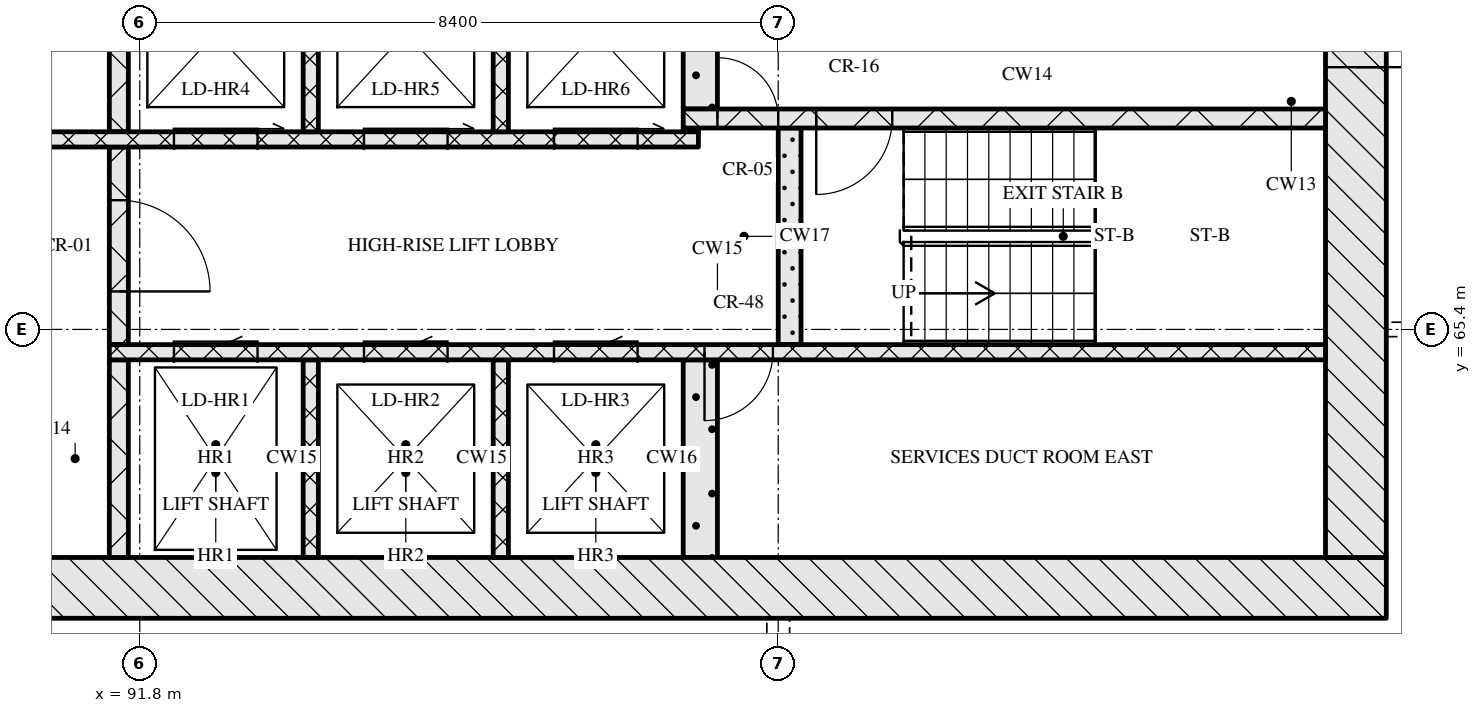
"""IFC4 building model, lengths in metres.
Left out: names, types, materials, properties, quantities, classifications, styles, units other than length and angle.
Written with IfcOpenShell. Run it as: python <this file> out.ifc"""

import sys

from ifc_helpers import new_model, si_unit, direction, frame, frame_2d, origin, place, context, subcontext, project, spatial, rectangle, extrude, element, fill, save


model = new_model("IFC4")
c1 = context("Model", 3, precision=1e-05, world=origin(), true_north=direction((0.0, 1.0)))
c2 = subcontext(c1, "Body", "Model", "MODEL_VIEW")
j1 = project(units=[si_unit("LENGTHUNIT", "METRE"), si_unit("PLANEANGLEUNIT", "RADIAN")], contexts=[c1])
p1 = place(None, origin())
s1 = spatial("IfcSite", under=j1, at=p1, CompositionType="ELEMENT")
p2 = place(p1, origin())
s2 = spatial("IfcBuilding", under=s1, at=p2, CompositionType="ELEMENT")
p3 = place(p2, frame((0.0, 0.0, 187.05)))
s3 = spatial("IfcBuildingStorey", under=s2, at=p3, CompositionType="ELEMENT", Elevation=187.05)
p4 = place(p3, frame((67.0, 62.0, 0.0), z_axis=(0.0, 0.0, 1.0), x_axis=(1.0, 0.0, 0.0)))
e1 = element("IfcWall", 1, at=p4, inside=s3, PredefinedType="SOLIDWALL", context=c2, shape_type="SweptSolid", body=[
    extrude(rectangle(XDim=41.2, YDim=0.8, at=frame_2d((20.6, 0.0))), origin(), (0.0, 0.0, 1.0), 3.32),
])
p5 = place(p4, frame((20.95, 0.0, 0.0)))
e2 = element("IfcOpeningElement", 2, at=p5, cuts=e1, PredefinedType="OPENING", context=c2, shape_type="SweptSolid", body=[
    extrude(rectangle(XDim=1.8, YDim=2.1, at=frame_2d((0.9, 1.05))), frame((0.0, 0.41, 0.0), z_axis=(0.0, -1.0, 0.0), x_axis=(1.0, 0.0, 0.0)), (0.0, 0.0, 1.0), 0.82),
])
p6 = place(p3, frame((107.8, 62.4, 0.0), z_axis=(0.0, 0.0, 1.0), x_axis=(0.0, 1.0, 0.0)))
e3 = element("IfcWall", 3, at=p6, inside=s3, PredefinedType="SOLIDWALL", context=c2, shape_type="SweptSolid", body=[
    extrude(rectangle(XDim=12.0, YDim=0.8, at=frame_2d((6.0, 0.0))), origin(), (0.0, 0.0, 1.0), 3.32),
])
p7 = place(p6, frame((6.45, 0.0, 0.0)))
e4 = element("IfcOpeningElement", 4, at=p7, cuts=e3, PredefinedType="OPENING", context=c2, shape_type="SweptSolid", body=[
    extrude(rectangle(XDim=1.2, YDim=2.1, at=frame_2d((0.6, 1.05))), frame((0.0, 0.41, 0.0), z_axis=(0.0, -1.0, 0.0), x_axis=(1.0, 0.0, 0.0)), (0.0, 0.0, 1.0), 0.82),
])
p8 = place(p3, frame((91.525, 62.4, 0.0), z_axis=(0.0, 0.0, 1.0), x_axis=(0.0, 1.0, 0.0)))
e5 = element("IfcWall", 5, at=p8, inside=s3, PredefinedType="SOLIDWALL", context=c2, shape_type="SweptSolid", body=[
    extrude(rectangle(XDim=2.6, YDim=0.25, at=frame_2d((1.3, 0.0))), origin(), (0.0, 0.0, 1.0), 3.32),
])
for number, where, z_axis, x_axis in (
    (6, (94.05, 62.4, 0.0), (0.0, 0.0, 1.0), (0.0, 1.0, 0.0)),
    (7, (96.55, 62.4, 0.0), (0.0, 0.0, 1.0), (0.0, 1.0, 0.0)),
):
    element("IfcWall", number, at=place(p3, frame(where, z_axis=z_axis, x_axis=x_axis)), inside=s3, PredefinedType="SOLIDWALL", context=c2, shape_type="SweptSolid", body=[
        extrude(rectangle(XDim=2.6, YDim=0.2, at=frame_2d((1.3, 0.0))), origin(), (0.0, 0.0, 1.0), 3.32),
    ])
p9 = place(p3, frame((99.175, 62.4, 0.0), z_axis=(0.0, 0.0, 1.0), x_axis=(0.0, 1.0, 0.0)))
e8 = element("IfcWall", 8, at=p9, inside=s3, PredefinedType="SOLIDWALL", context=c2, shape_type="SweptSolid", body=[
    extrude(rectangle(XDim=2.6, YDim=0.45, at=frame_2d((1.3, 0.0))), origin(), (0.0, 0.0, 1.0), 3.32),
])
p10 = place(p3, frame((91.4, 65.1, 0.0), z_axis=(0.0, 0.0, 1.0), x_axis=(1.0, 0.0, 0.0)))
e9 = element("IfcWall", 9, at=p10, inside=s3, PredefinedType="SOLIDWALL", context=c2, shape_type="SweptSolid", body=[
    extrude(rectangle(XDim=16.0, YDim=0.2, at=frame_2d((8.0, 0.0))), origin(), (0.0, 0.0, 1.0), 3.32),
])
p11 = place(p10, frame((0.85, 0.0, 0.0)))
e10 = element("IfcOpeningElement", 10, at=p11, cuts=e9, PredefinedType="OPENING", context=c2, shape_type="SweptSolid", body=[
    extrude(rectangle(XDim=1.1, YDim=2.1, at=frame_2d((0.55, 1.05))), frame((0.0, 0.11, 0.0), z_axis=(0.0, -1.0, 0.0), x_axis=(1.0, 0.0, 0.0)), (0.0, 0.0, 1.0), 0.22),
])
p12 = place(p10, frame((3.35, 0.0, 0.0)))
e11 = element("IfcOpeningElement", 11, at=p12, cuts=e9, PredefinedType="OPENING", context=c2, shape_type="SweptSolid", body=[
    extrude(rectangle(XDim=1.1, YDim=2.1, at=frame_2d((0.55, 1.05))), frame((0.0, 0.11, 0.0), z_axis=(0.0, -1.0, 0.0), x_axis=(1.0, 0.0, 0.0)), (0.0, 0.0, 1.0), 0.22),
])
p13 = place(p10, frame((5.85, 0.0, 0.0)))
e12 = element("IfcOpeningElement", 12, at=p13, cuts=e9, PredefinedType="OPENING", context=c2, shape_type="SweptSolid", body=[
    extrude(rectangle(XDim=1.1, YDim=2.1, at=frame_2d((0.55, 1.05))), frame((0.0, 0.11, 0.0), z_axis=(0.0, -1.0, 0.0), x_axis=(1.0, 0.0, 0.0)), (0.0, 0.0, 1.0), 0.22),
])
p14 = place(p10, frame((7.83, 0.0, 0.0)))
e13 = element("IfcOpeningElement", 13, at=p14, cuts=e9, PredefinedType="OPENING", context=c2, shape_type="SweptSolid", body=[
    extrude(rectangle(XDim=0.9, YDim=2.1, at=frame_2d((0.45, 1.05))), frame((0.0, 0.11, 0.0), z_axis=(0.0, -1.0, 0.0), x_axis=(1.0, 0.0, 0.0)), (0.0, 0.0, 1.0), 0.22),
])
p15 = place(p3, frame((91.525, 65.2, 0.0), z_axis=(0.0, 0.0, 1.0), x_axis=(0.0, 1.0, 0.0)))
e14 = element("IfcWall", 14, at=p15, inside=s3, PredefinedType="SOLIDWALL", context=c2, shape_type="SweptSolid", body=[
    extrude(rectangle(XDim=2.6, YDim=0.25, at=frame_2d((1.3, 0.0))), origin(), (0.0, 0.0, 1.0), 3.32),
])
p16 = place(p15, frame((0.7, 0.0, 0.0)))
e15 = element("IfcOpeningElement", 15, at=p16, cuts=e14, PredefinedType="OPENING", context=c2, shape_type="SweptSolid", body=[
    extrude(rectangle(XDim=1.2, YDim=2.1, at=frame_2d((0.6, 1.05))), frame((0.0, 0.135, 0.0), z_axis=(0.0, -1.0, 0.0), x_axis=(1.0, 0.0, 0.0)), (0.0, 0.0, 1.0), 0.27),
])
p17 = place(p3, frame((100.35, 65.2, 0.0), z_axis=(0.0, 0.0, 1.0), x_axis=(0.0, 1.0, 0.0)))
e16 = element("IfcWall", 16, at=p17, inside=s3, PredefinedType="SOLIDWALL", context=c2, shape_type="SweptSolid", body=[
    extrude(rectangle(XDim=2.85, YDim=0.3, at=frame_2d((1.425, 0.0))), origin(), (0.0, 0.0, 1.0), 3.32),
])
p18 = place(p3, frame((76.05, 67.9, 0.0), z_axis=(0.0, 0.0, 1.0), x_axis=(1.0, 0.0, 0.0)))
e17 = element("IfcWall", 17, at=p18, inside=s3, PredefinedType="SOLIDWALL", context=c2, shape_type="SweptSolid", body=[
    extrude(rectangle(XDim=23.1, YDim=0.2, at=frame_2d((11.55, 0.0))), origin(), (0.0, 0.0, 1.0), 3.32),
])
p19 = place(p18, frame((0.75, 0.0, 0.0)))
e18 = element("IfcOpeningElement", 18, at=p19, cuts=e17, PredefinedType="OPENING", context=c2, shape_type="SweptSolid", body=[
    extrude(rectangle(XDim=0.9, YDim=2.1, at=frame_2d((0.45, 1.05))), frame((0.0, 0.11, 0.0), z_axis=(0.0, -1.0, 0.0), x_axis=(1.0, 0.0, 0.0)), (0.0, 0.0, 1.0), 0.22),
])
p20 = place(p18, frame((3.32, 0.0, 0.0)))
e19 = element("IfcOpeningElement", 19, at=p20, cuts=e17, PredefinedType="OPENING", context=c2, shape_type="SweptSolid", body=[
    extrude(rectangle(XDim=0.9, YDim=2.1, at=frame_2d((0.45, 1.05))), frame((0.0, 0.11, 0.0), z_axis=(0.0, -1.0, 0.0), x_axis=(1.0, 0.0, 0.0)), (0.0, 0.0, 1.0), 0.22),
])
p21 = place(p18, frame((5.77, 0.0, 0.0)))
e20 = element("IfcOpeningElement", 20, at=p21, cuts=e17, PredefinedType="OPENING", context=c2, shape_type="SweptSolid", body=[
    extrude(rectangle(XDim=0.9, YDim=2.1, at=frame_2d((0.45, 1.05))), frame((0.0, 0.11, 0.0), z_axis=(0.0, -1.0, 0.0), x_axis=(1.0, 0.0, 0.0)), (0.0, 0.0, 1.0), 0.22),
])
p22 = place(p18, frame((8.45, 0.0, 0.0)))
e21 = element("IfcOpeningElement", 21, at=p22, cuts=e17, PredefinedType="OPENING", context=c2, shape_type="SweptSolid", body=[
    extrude(rectangle(XDim=0.9, YDim=2.1, at=frame_2d((0.45, 1.05))), frame((0.0, 0.11, 0.0), z_axis=(0.0, -1.0, 0.0), x_axis=(1.0, 0.0, 0.0)), (0.0, 0.0, 1.0), 0.22),
])
p23 = place(p18, frame((10.91, 0.0, 0.0)))
e22 = element("IfcOpeningElement", 22, at=p23, cuts=e17, PredefinedType="OPENING", context=c2, shape_type="SweptSolid", body=[
    extrude(rectangle(XDim=0.9, YDim=2.1, at=frame_2d((0.45, 1.05))), frame((0.0, 0.11, 0.0), z_axis=(0.0, -1.0, 0.0), x_axis=(1.0, 0.0, 0.0)), (0.0, 0.0, 1.0), 0.22),
])
p24 = place(p18, frame((13.55, 0.0, 0.0)))
e23 = element("IfcOpeningElement", 23, at=p24, cuts=e17, PredefinedType="OPENING", context=c2, shape_type="SweptSolid", body=[
    extrude(rectangle(XDim=1.0, YDim=2.1, at=frame_2d((0.5, 1.05))), frame((0.0, 0.11, 0.0), z_axis=(0.0, -1.0, 0.0), x_axis=(1.0, 0.0, 0.0)), (0.0, 0.0, 1.0), 0.22),
])
p25 = place(p18, frame((16.2, 0.0, 0.0)))
e24 = element("IfcOpeningElement", 24, at=p25, cuts=e17, PredefinedType="OPENING", context=c2, shape_type="SweptSolid", body=[
    extrude(rectangle(XDim=1.1, YDim=2.1, at=frame_2d((0.55, 1.05))), frame((0.0, 0.11, 0.0), z_axis=(0.0, -1.0, 0.0), x_axis=(1.0, 0.0, 0.0)), (0.0, 0.0, 1.0), 0.22),
])
p26 = place(p18, frame((18.7, 0.0, 0.0)))
e25 = element("IfcOpeningElement", 25, at=p26, cuts=e17, PredefinedType="OPENING", context=c2, shape_type="SweptSolid", body=[
    extrude(rectangle(XDim=1.1, YDim=2.1, at=frame_2d((0.55, 1.05))), frame((0.0, 0.11, 0.0), z_axis=(0.0, -1.0, 0.0), x_axis=(1.0, 0.0, 0.0)), (0.0, 0.0, 1.0), 0.22),
])
p27 = place(p18, frame((21.2, 0.0, 0.0)))
e26 = element("IfcOpeningElement", 26, at=p27, cuts=e17, PredefinedType="OPENING", context=c2, shape_type="SweptSolid", body=[
    extrude(rectangle(XDim=1.1, YDim=2.1, at=frame_2d((0.55, 1.05))), frame((0.0, 0.11, 0.0), z_axis=(0.0, -1.0, 0.0), x_axis=(1.0, 0.0, 0.0)), (0.0, 0.0, 1.0), 0.22),
])
p28 = place(p3, frame((91.525, 68.0, 0.0), z_axis=(0.0, 0.0, 1.0), x_axis=(0.0, 1.0, 0.0)))
e27 = element("IfcWall", 27, at=p28, inside=s3, PredefinedType="SOLIDWALL", context=c2, shape_type="SweptSolid", body=[
    extrude(rectangle(XDim=2.6, YDim=0.25, at=frame_2d((1.3, 0.0))), origin(), (0.0, 0.0, 1.0), 3.32),
])
for number, where, z_axis, x_axis in (
    (28, (94.05, 68.0, 0.0), (0.0, 0.0, 1.0), (0.0, 1.0, 0.0)),
    (29, (96.55, 68.0, 0.0), (0.0, 0.0, 1.0), (0.0, 1.0, 0.0)),
):
    element("IfcWall", number, at=place(p3, frame(where, z_axis=z_axis, x_axis=x_axis)), inside=s3, PredefinedType="SOLIDWALL", context=c2, shape_type="SweptSolid", body=[
        extrude(rectangle(XDim=2.6, YDim=0.2, at=frame_2d((1.3, 0.0))), origin(), (0.0, 0.0, 1.0), 3.32),
    ])
p29 = place(p3, frame((98.95, 68.025, 0.0), z_axis=(0.0, 0.0, 1.0), x_axis=(1.0, 0.0, 0.0)))
e30 = element("IfcWall", 30, at=p29, inside=s3, PredefinedType="SOLIDWALL", context=c2, shape_type="SweptSolid", body=[
    extrude(rectangle(XDim=0.2, YDim=0.05, at=frame_2d((0.1, 0.0))), origin(), (0.0, 0.0, 1.0), 3.32),
])
p30 = place(p3, frame((98.95, 68.175, 0.0), z_axis=(0.0, 0.0, 1.0), x_axis=(1.0, 0.0, 0.0)))
e31 = element("IfcWall", 31, at=p30, inside=s3, PredefinedType="SOLIDWALL", context=c2, shape_type="SweptSolid", body=[
    extrude(rectangle(XDim=8.45, YDim=0.25, at=frame_2d((4.225, 0.0))), origin(), (0.0, 0.0, 1.0), 3.32),
])
p31 = place(p30, frame((0.45, 0.0, 0.0)))
e32 = element("IfcOpeningElement", 32, at=p31, cuts=e31, PredefinedType="OPENING", context=c2, shape_type="SweptSolid", body=[
    extrude(rectangle(XDim=0.8, YDim=2.1, at=frame_2d((0.4, 1.05))), frame((0.0, 0.135, 0.0), z_axis=(0.0, -1.0, 0.0), x_axis=(1.0, 0.0, 0.0)), (0.0, 0.0, 1.0), 0.27),
])
p32 = place(p30, frame((1.75, 0.0, 0.0)))
e33 = element("IfcOpeningElement", 33, at=p32, cuts=e31, PredefinedType="OPENING", context=c2, shape_type="SweptSolid", body=[
    extrude(rectangle(XDim=1.0, YDim=2.1, at=frame_2d((0.5, 1.05))), frame((0.0, 0.135, 0.0), z_axis=(0.0, -1.0, 0.0), x_axis=(1.0, 0.0, 0.0)), (0.0, 0.0, 1.0), 0.27),
])
p33 = place(p3, frame((99.175, 68.3, 0.0), z_axis=(0.0, 0.0, 1.0), x_axis=(0.0, 1.0, 0.0)))
e34 = element("IfcWall", 34, at=p33, inside=s3, PredefinedType="SOLIDWALL", context=c2, shape_type="SweptSolid", body=[
    extrude(rectangle(XDim=2.3, YDim=0.45, at=frame_2d((1.15, 0.0))), origin(), (0.0, 0.0, 1.0), 3.32),
])
p34 = place(p11, origin())
e35 = element("IfcDoor", 35, at=p34, inside=s3, OperationType="SLIDING_TO_LEFT", PredefinedType="DOOR", context=c2, shape_type="SweptSolid", body=[
    extrude(rectangle(XDim=1.1, YDim=2.1, at=frame_2d((0.55, 1.05))), frame((0.0, 0.025, 0.0), z_axis=(0.0, -1.0, 0.0), x_axis=(1.0, 0.0, 0.0)), (0.0, 0.0, 1.0), 0.05),
])
fill(e10, e35)
p35 = place(p12, origin())
e36 = element("IfcDoor", 36, at=p35, inside=s3, OperationType="SLIDING_TO_LEFT", PredefinedType="DOOR", context=c2, shape_type="SweptSolid", body=[
    extrude(rectangle(XDim=1.1, YDim=2.1, at=frame_2d((0.55, 1.05))), frame((0.0, 0.025, 0.0), z_axis=(0.0, -1.0, 0.0), x_axis=(1.0, 0.0, 0.0)), (0.0, 0.0, 1.0), 0.05),
])
fill(e11, e36)
p36 = place(p13, origin())
e37 = element("IfcDoor", 37, at=p36, inside=s3, OperationType="SLIDING_TO_LEFT", PredefinedType="DOOR", context=c2, shape_type="SweptSolid", body=[
    extrude(rectangle(XDim=1.1, YDim=2.1, at=frame_2d((0.55, 1.05))), frame((0.0, 0.025, 0.0), z_axis=(0.0, -1.0, 0.0), x_axis=(1.0, 0.0, 0.0)), (0.0, 0.0, 1.0), 0.05),
])
fill(e12, e37)
p37 = place(p14, origin())
e38 = element("IfcDoor", 38, at=p37, inside=s3, OperationType="SINGLE_SWING_RIGHT", PredefinedType="DOOR", context=c2, shape_type="SweptSolid", body=[
    extrude(rectangle(XDim=0.9, YDim=2.1, at=frame_2d((0.45, 1.05))), frame((0.0, 0.025, 0.0), z_axis=(0.0, -1.0, 0.0), x_axis=(1.0, 0.0, 0.0)), (0.0, 0.0, 1.0), 0.05),
])
fill(e13, e38)
p38 = place(p16, origin())
e39 = element("IfcDoor", 39, at=p38, inside=s3, OperationType="SINGLE_SWING_RIGHT", PredefinedType="DOOR", context=c2, shape_type="SweptSolid", body=[
    extrude(rectangle(XDim=1.2, YDim=2.1, at=frame_2d((0.6, 1.05))), frame((0.0, 0.025, 0.0), z_axis=(0.0, -1.0, 0.0), x_axis=(1.0, 0.0, 0.0)), (0.0, 0.0, 1.0), 0.05),
])
fill(e15, e39)
p39 = place(p25, origin())
e40 = element("IfcDoor", 40, at=p39, inside=s3, OperationType="SLIDING_TO_RIGHT", PredefinedType="DOOR", context=c2, shape_type="SweptSolid", body=[
    extrude(rectangle(XDim=1.1, YDim=2.1, at=frame_2d((0.55, 1.05))), frame((0.0, 0.025, 0.0), z_axis=(0.0, -1.0, 0.0), x_axis=(1.0, 0.0, 0.0)), (0.0, 0.0, 1.0), 0.05),
])
fill(e24, e40)
p40 = place(p26, origin())
e41 = element("IfcDoor", 41, at=p40, inside=s3, OperationType="SLIDING_TO_RIGHT", PredefinedType="DOOR", context=c2, shape_type="SweptSolid", body=[
    extrude(rectangle(XDim=1.1, YDim=2.1, at=frame_2d((0.55, 1.05))), frame((0.0, 0.025, 0.0), z_axis=(0.0, -1.0, 0.0), x_axis=(1.0, 0.0, 0.0)), (0.0, 0.0, 1.0), 0.05),
])
fill(e25, e41)
p41 = place(p27, origin())
e42 = element("IfcDoor", 42, at=p41, inside=s3, OperationType="SLIDING_TO_RIGHT", PredefinedType="DOOR", context=c2, shape_type="SweptSolid", body=[
    extrude(rectangle(XDim=1.1, YDim=2.1, at=frame_2d((0.55, 1.05))), frame((0.0, 0.025, 0.0), z_axis=(0.0, -1.0, 0.0), x_axis=(1.0, 0.0, 0.0)), (0.0, 0.0, 1.0), 0.05),
])
fill(e26, e42)
p42 = place(p31, origin())
e43 = element("IfcDoor", 43, at=p42, inside=s3, OperationType="SINGLE_SWING_LEFT", PredefinedType="DOOR", context=c2, shape_type="SweptSolid", body=[
    extrude(rectangle(XDim=0.8, YDim=2.1, at=frame_2d((0.4, 1.05))), frame((0.0, 0.025, 0.0), z_axis=(0.0, -1.0, 0.0), x_axis=(1.0, 0.0, 0.0)), (0.0, 0.0, 1.0), 0.05),
])
fill(e32, e43)
p43 = place(p32, origin())
e44 = element("IfcDoor", 44, at=p43, inside=s3, OperationType="SINGLE_SWING_RIGHT", PredefinedType="DOOR", context=c2, shape_type="SweptSolid", body=[
    extrude(rectangle(XDim=1.0, YDim=2.1, at=frame_2d((0.5, 1.05))), frame((0.0, 0.025, 0.0), z_axis=(0.0, -1.0, 0.0), x_axis=(1.0, 0.0, 0.0)), (0.0, 0.0, 1.0), 0.05),
])
fill(e33, e44)
p44 = place(p7, origin())
e45 = element("IfcDoor", 45, at=p44, inside=s3, OperationType="SINGLE_SWING_RIGHT", PredefinedType="DOOR", context=c2, shape_type="SweptSolid", body=[
    extrude(rectangle(XDim=1.2, YDim=2.1, at=frame_2d((0.6, 1.05))), frame((0.0, 0.025, 0.0), z_axis=(0.0, -1.0, 0.0), x_axis=(1.0, 0.0, 0.0)), (0.0, 0.0, 1.0), 0.05),
])
fill(e4, e45)
save(model, sys.argv[1])
